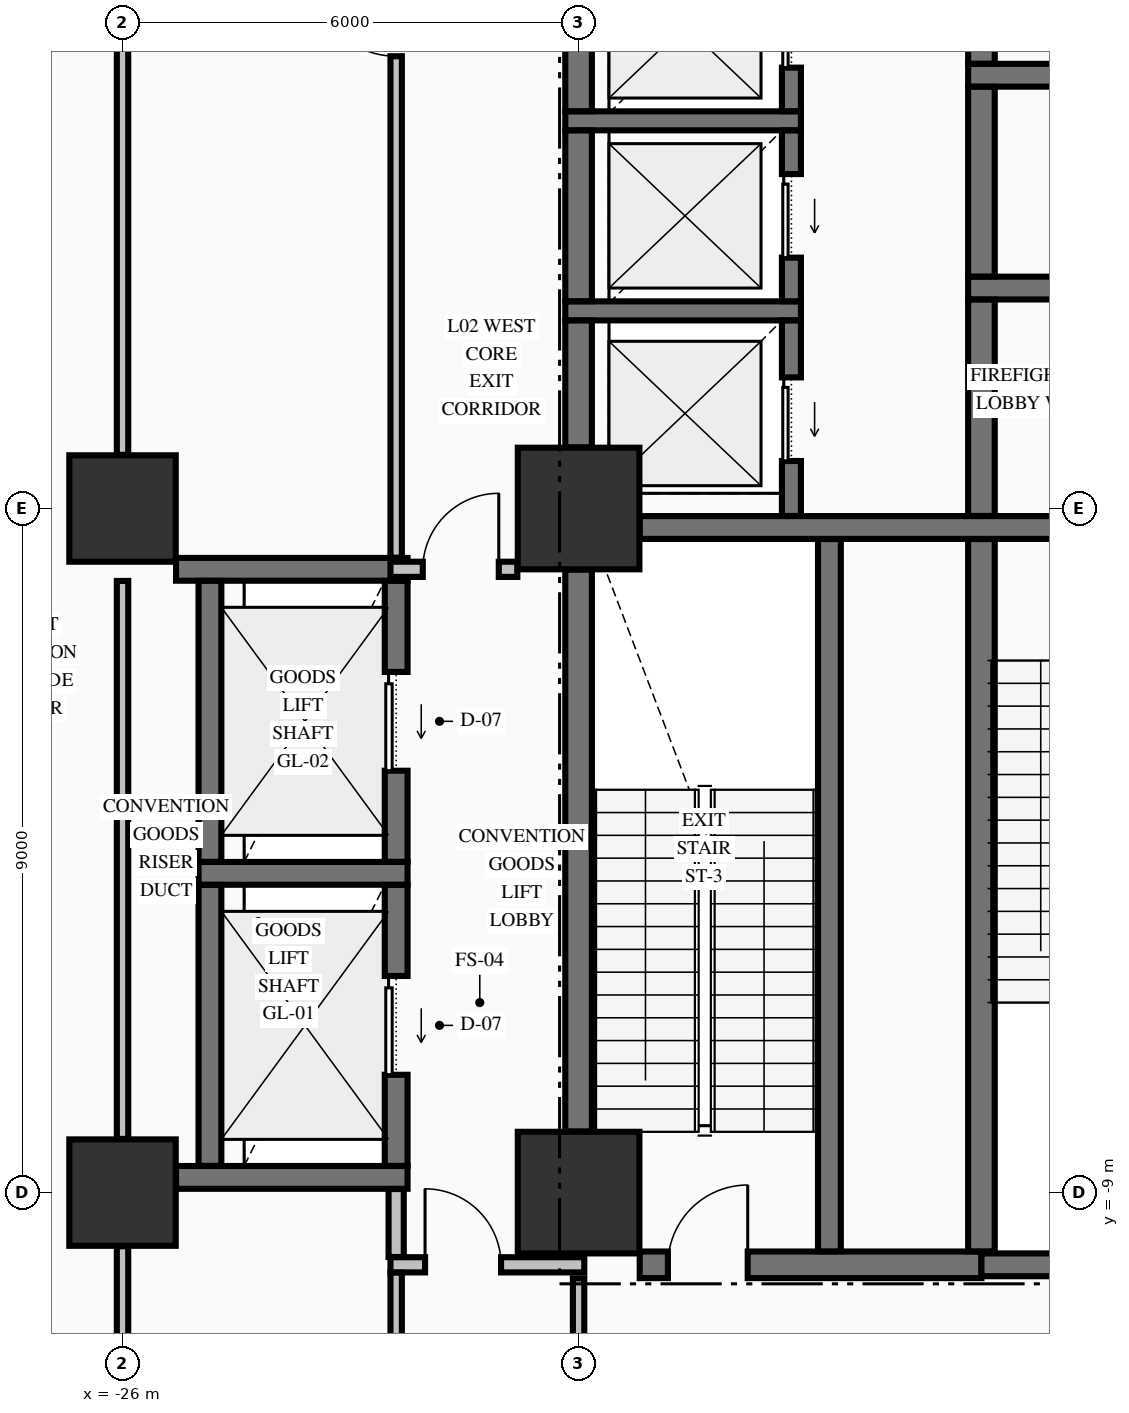
"""IFC4 building model, lengths in metres.
Left out: names, types, materials, properties, quantities, classifications, styles, units other than length and angle.
Written with IfcOpenShell. Run it as: python <this file> out.ifc"""

import sys

from ifc_helpers import new_model, si_unit, direction, frame, frame_2d, origin, origin_2d, place, context, subcontext, project, spatial, rectangle, extrude, element, fill, save


model = new_model("IFC4")
c1 = context("Model", 3, precision=1e-05, world=origin(), true_north=direction((0.0, 1.0)))
c2 = subcontext(c1, "Body", "Model", "MODEL_VIEW")
j1 = project(units=[si_unit("LENGTHUNIT", "METRE"), si_unit("PLANEANGLEUNIT", "RADIAN")], contexts=[c1])
p1 = place(None, origin())
s1 = spatial("IfcSite", under=j1, at=p1, CompositionType="ELEMENT")
p2 = place(p1, origin())
s2 = spatial("IfcBuilding", under=s1, at=p2, CompositionType="ELEMENT")
p3 = place(p2, frame((0.0, 0.0, 10.88)))
s3 = spatial("IfcBuildingStorey", under=s2, at=p3, CompositionType="ELEMENT", Elevation=10.88)
for number, where, z_axis, x_axis in (
    (1, (-26.0, -9.0, 0.0), (0.0, 0.0, 1.0), (1.0, 0.0, 0.0)),
    (2, (-26.0, 0.0, 0.0), (0.0, 0.0, 1.0), (1.0, 0.0, 0.0)),
):
    element("IfcColumn", number, at=place(p3, frame(where, z_axis=z_axis, x_axis=x_axis)), inside=s3, PredefinedType="COLUMN", context=c2, shape_type="SweptSolid", body=[
        extrude(rectangle(XDim=1.4, YDim=1.4, at=origin_2d()), origin(), (0.0, 0.0, 1.0), 5.09),
    ])
for number, where, z_axis, x_axis in (
    (3, (-20.0, -9.0, 0.0), (0.0, 0.0, 1.0), (1.0, 0.0, 0.0)),
    (4, (-20.0, 0.0, 0.0), (0.0, 0.0, 1.0), (1.0, 0.0, 0.0)),
):
    element("IfcColumn", number, at=place(p3, frame(where, z_axis=z_axis, x_axis=x_axis)), inside=s3, PredefinedType="COLUMN", context=c2, shape_type="SweptSolid", body=[
        extrude(rectangle(XDim=1.6, YDim=1.6, at=origin_2d()), origin(), (0.0, 0.0, 1.0), 5.09),
    ])
p4 = place(p3, frame((-19.196, -9.95, 0.0), z_axis=(0.0, 0.0, 1.0), x_axis=(1.0, 0.0, 0.0)))
e5 = element("IfcWall", 5, at=p4, inside=s3, PredefinedType="SHEAR", context=c2, shape_type="SweptSolid", body=[
    extrude(rectangle(XDim=4.496, YDim=0.35, at=frame_2d((2.248, 0.0))), origin(), (0.0, 0.0, 1.0), 5.09),
])
p5 = place(p4, frame((0.371, 0.0, 0.0)))
e6 = element("IfcOpeningElement", 6, at=p5, cuts=e5, PredefinedType="OPENING", context=c2, shape_type="SweptSolid", body=[
    extrude(rectangle(XDim=1.05, YDim=2.15, at=frame_2d((0.525, 1.075))), frame((0.0, 0.185, 0.0), z_axis=(0.0, -1.0, 0.0), x_axis=(1.0, 0.0, 0.0)), (0.0, 0.0, 1.0), 0.37),
])
p6 = place(p3, frame((-14.7, -9.95, 0.0), z_axis=(0.0, 0.0, 1.0), x_axis=(1.0, 0.0, 0.0)))
e7 = element("IfcWall", 7, at=p6, inside=s3, PredefinedType="SHEAR", context=c2, shape_type="SweptSolid", body=[
    extrude(rectangle(XDim=3.85, YDim=0.3, at=frame_2d((1.925, 0.0))), origin(), (0.0, 0.0, 1.0), 5.09),
])
p7 = place(p3, frame((-25.296, -8.8, 0.0), z_axis=(0.0, 0.0, 1.0), x_axis=(1.0, 0.0, 0.0)))
e8 = element("IfcWall", 8, at=p7, inside=s3, PredefinedType="SHEAR", context=c2, shape_type="SweptSolid", body=[
    extrude(rectangle(XDim=3.046, YDim=0.3, at=frame_2d((1.523, 0.0))), origin(), (0.0, 0.0, 1.0), 5.09),
])
p8 = place(p3, frame((-25.0, -4.8, 0.0), z_axis=(0.0, 0.0, 1.0), x_axis=(1.0, 0.0, 0.0)))
e9 = element("IfcWall", 9, at=p8, inside=s3, PredefinedType="SHEAR", context=c2, shape_type="SweptSolid", body=[
    extrude(rectangle(XDim=2.75, YDim=0.3, at=frame_2d((1.375, 0.0))), origin(), (0.0, 0.0, 1.0), 5.09),
])
p9 = place(p3, frame((-25.296, -0.8, 0.0), z_axis=(0.0, 0.0, 1.0), x_axis=(1.0, 0.0, 0.0)))
e10 = element("IfcWall", 10, at=p9, inside=s3, PredefinedType="SHEAR", context=c2, shape_type="SweptSolid", body=[
    extrude(rectangle(XDim=3.046, YDim=0.3, at=frame_2d((1.523, 0.0))), origin(), (0.0, 0.0, 1.0), 5.09),
])
p10 = place(p3, frame((-19.196, -0.25, 0.0), z_axis=(0.0, 0.0, 1.0), x_axis=(1.0, 0.0, 0.0)))
e11 = element("IfcWall", 11, at=p10, inside=s3, PredefinedType="SHEAR", context=c2, shape_type="SweptSolid", body=[
    extrude(rectangle(XDim=7.392, YDim=0.3, at=frame_2d((3.696, 0.0))), origin(), (0.0, 0.0, 1.0), 5.09),
])
p11 = place(p10, frame((5.496, 0.0, 0.0)))
e12 = element("IfcOpeningElement", 12, at=p11, cuts=e11, PredefinedType="OPENING", context=c2, shape_type="SweptSolid", body=[
    extrude(rectangle(XDim=1.1, YDim=2.15, at=frame_2d((0.55, 1.075))), frame((0.0, 0.16, 0.0), z_axis=(0.0, -1.0, 0.0), x_axis=(1.0, 0.0, 0.0)), (0.0, 0.0, 1.0), 0.32),
])
p12 = place(p3, frame((-20.175, 2.6, 0.0), z_axis=(0.0, 0.0, 1.0), x_axis=(1.0, 0.0, 0.0)))
e13 = element("IfcWall", 13, at=p12, inside=s3, PredefinedType="SOLIDWALL", context=c2, shape_type="SweptSolid", body=[
    extrude(rectangle(XDim=3.1, YDim=0.25, at=frame_2d((1.55, 0.0))), origin(), (0.0, 0.0, 1.0), 5.09),
])
p13 = place(p3, frame((-14.875, 2.9, 0.0), z_axis=(0.0, 0.0, 1.0), x_axis=(1.0, 0.0, 0.0)))
e14 = element("IfcWall", 14, at=p13, inside=s3, PredefinedType="SHEAR", context=c2, shape_type="SweptSolid", body=[
    extrude(rectangle(XDim=4.025, YDim=0.3, at=frame_2d((2.012, 0.0))), origin(), (0.0, 0.0, 1.0), 5.09),
])
p14 = place(p13, frame((2.075, 0.0, 0.0)))
e15 = element("IfcOpeningElement", 15, at=p14, cuts=e14, PredefinedType="OPENING", context=c2, shape_type="SweptSolid", body=[
    extrude(rectangle(XDim=1.1, YDim=2.2, at=frame_2d((0.55, 1.1))), frame((0.0, 0.16, 0.0), z_axis=(0.0, -1.0, 0.0), x_axis=(1.0, 0.0, 0.0)), (0.0, 0.0, 1.0), 0.32),
])
p15 = place(p3, frame((-20.175, 5.1, 0.0), z_axis=(0.0, 0.0, 1.0), x_axis=(1.0, 0.0, 0.0)))
e16 = element("IfcWall", 16, at=p15, inside=s3, PredefinedType="SOLIDWALL", context=c2, shape_type="SweptSolid", body=[
    extrude(rectangle(XDim=3.1, YDim=0.25, at=frame_2d((1.55, 0.0))), origin(), (0.0, 0.0, 1.0), 5.09),
])
p16 = place(p3, frame((-14.875, 5.7, 0.0), z_axis=(0.0, 0.0, 1.0), x_axis=(1.0, 0.0, 0.0)))
e17 = element("IfcWall", 17, at=p16, inside=s3, PredefinedType="SHEAR", context=c2, shape_type="SweptSolid", body=[
    extrude(rectangle(XDim=4.025, YDim=0.3, at=frame_2d((2.012, 0.0))), origin(), (0.0, 0.0, 1.0), 5.09),
])
p17 = place(p3, frame((-22.475, -9.95, 0.0), z_axis=(0.0, 0.0, 1.0), x_axis=(1.0, 0.0, 0.0)))
e18 = element("IfcWall", 18, at=p17, inside=s3, PredefinedType="PARTITIONING", context=c2, shape_type="SweptSolid", body=[
    extrude(rectangle(XDim=2.55, YDim=0.2, at=frame_2d((1.275, 0.0))), origin(), (0.0, 0.0, 1.0), 5.09),
])
p18 = place(p17, frame((0.455, 0.0, 0.0)))
e19 = element("IfcOpeningElement", 19, at=p18, cuts=e18, PredefinedType="OPENING", context=c2, shape_type="SweptSolid", body=[
    extrude(rectangle(XDim=1.0, YDim=2.15, at=frame_2d((0.5, 1.075))), frame((0.0, 0.11, 0.0), z_axis=(0.0, -1.0, 0.0), x_axis=(1.0, 0.0, 0.0)), (0.0, 0.0, 1.0), 0.22),
])
p19 = place(p3, frame((-22.475, -0.8, 0.0), z_axis=(0.0, 0.0, 1.0), x_axis=(1.0, 0.0, 0.0)))
e20 = element("IfcWall", 20, at=p19, inside=s3, PredefinedType="PARTITIONING", context=c2, shape_type="SweptSolid", body=[
    extrude(rectangle(XDim=1.669, YDim=0.2, at=frame_2d((0.834, 0.0))), origin(), (0.0, 0.0, 1.0), 5.09),
])
p20 = place(p19, frame((0.425, 0.0, 0.0)))
e21 = element("IfcOpeningElement", 21, at=p20, cuts=e20, PredefinedType="OPENING", context=c2, shape_type="SweptSolid", body=[
    extrude(rectangle(XDim=1.0, YDim=2.15, at=frame_2d((0.5, 1.075))), frame((0.0, 0.11, 0.0), z_axis=(0.0, -1.0, 0.0), x_axis=(1.0, 0.0, 0.0)), (0.0, 0.0, 1.0), 0.22),
])
for number, where, z_axis, x_axis in (
    (22, (-24.85, -8.648, 0.0), (0.0, 0.0, 1.0), (0.0, 1.0, 0.0)),
    (23, (-24.85, -4.648, 0.0), (0.0, 0.0, 1.0), (0.0, 1.0, 0.0)),
):
    element("IfcWall", number, at=place(p3, frame(where, z_axis=z_axis, x_axis=x_axis)), inside=s3, PredefinedType="SHEAR", context=c2, shape_type="SweptSolid", body=[
        extrude(rectangle(XDim=3.696, YDim=0.3, at=frame_2d((1.848, 0.0))), origin(), (0.0, 0.0, 1.0), 5.09),
    ])
p21 = place(p3, frame((-22.4, -8.648, 0.0), z_axis=(0.0, 0.0, 1.0), x_axis=(0.0, 1.0, 0.0)))
e24 = element("IfcWall", 24, at=p21, inside=s3, PredefinedType="SHEAR", context=c2, shape_type="SweptSolid", body=[
    extrude(rectangle(XDim=3.696, YDim=0.3, at=frame_2d((1.848, 0.0))), origin(), (0.0, 0.0, 1.0), 5.09),
])
p22 = place(p21, frame((1.198, 0.0, 0.0)))
e25 = element("IfcOpeningElement", 25, at=p22, cuts=e24, PredefinedType="OPENING", context=c2, shape_type="SweptSolid", body=[
    extrude(rectangle(XDim=1.3, YDim=2.3, at=frame_2d((0.65, 1.15))), frame((0.0, 0.16, 0.0), z_axis=(0.0, -1.0, 0.0), x_axis=(1.0, 0.0, 0.0)), (0.0, 0.0, 1.0), 0.32),
])
p23 = place(p3, frame((-22.4, -4.648, 0.0), z_axis=(0.0, 0.0, 1.0), x_axis=(0.0, 1.0, 0.0)))
e26 = element("IfcWall", 26, at=p23, inside=s3, PredefinedType="SHEAR", context=c2, shape_type="SweptSolid", body=[
    extrude(rectangle(XDim=3.696, YDim=0.3, at=frame_2d((1.848, 0.0))), origin(), (0.0, 0.0, 1.0), 5.09),
])
p24 = place(p23, frame((1.198, 0.0, 0.0)))
e27 = element("IfcOpeningElement", 27, at=p24, cuts=e26, PredefinedType="OPENING", context=c2, shape_type="SweptSolid", body=[
    extrude(rectangle(XDim=1.3, YDim=2.3, at=frame_2d((0.65, 1.15))), frame((0.0, 0.16, 0.0), z_axis=(0.0, -1.0, 0.0), x_axis=(1.0, 0.0, 0.0)), (0.0, 0.0, 1.0), 0.32),
])
p25 = place(p3, frame((-20.0, -8.196, 0.0), z_axis=(0.0, 0.0, 1.0), x_axis=(0.0, 1.0, 0.0)))
e28 = element("IfcWall", 28, at=p25, inside=s3, PredefinedType="SHEAR", context=c2, shape_type="SweptSolid", body=[
    extrude(rectangle(XDim=7.392, YDim=0.35, at=frame_2d((3.696, 0.0))), origin(), (0.0, 0.0, 1.0), 5.09),
])
p26 = place(p3, frame((-20.0, 0.804, 0.0), z_axis=(0.0, 0.0, 1.0), x_axis=(0.0, 1.0, 0.0)))
e29 = element("IfcWall", 29, at=p26, inside=s3, PredefinedType="SHEAR", context=c2, shape_type="SweptSolid", body=[
    extrude(rectangle(XDim=1.669, YDim=0.35, at=frame_2d((0.834, 0.0))), origin(), (0.0, 0.0, 1.0), 5.09),
])
for number, where, z_axis, x_axis in (
    (30, (-20.0, 2.727, 0.0), (0.0, 0.0, 1.0), (0.0, 1.0, 0.0)),
    (31, (-20.0, 5.227, 0.0), (0.0, 0.0, 1.0), (0.0, 1.0, 0.0)),
):
    element("IfcWall", number, at=place(p3, frame(where, z_axis=z_axis, x_axis=x_axis)), inside=s3, PredefinedType="SHEAR", context=c2, shape_type="SweptSolid", body=[
        extrude(rectangle(XDim=2.246, YDim=0.35, at=frame_2d((1.123, 0.0))), origin(), (0.0, 0.0, 1.0), 5.09),
    ])
p27 = place(p3, frame((-17.2, -0.098, 0.0), z_axis=(0.0, 0.0, 1.0), x_axis=(0.0, 1.0, 0.0)))
e32 = element("IfcWall", 32, at=p27, inside=s3, PredefinedType="SOLIDWALL", context=c2, shape_type="SweptSolid", body=[
    extrude(rectangle(XDim=2.571, YDim=0.25, at=frame_2d((1.285, 0.0))), origin(), (0.0, 0.0, 1.0), 5.09),
])
p28 = place(p27, frame((0.723, 0.0, 0.0)))
e33 = element("IfcOpeningElement", 33, at=p28, cuts=e32, PredefinedType="OPENING", context=c2, shape_type="SweptSolid", body=[
    extrude(rectangle(XDim=1.1, YDim=2.2, at=frame_2d((0.55, 1.1))), frame((0.0, 0.135, 0.0), z_axis=(0.0, -1.0, 0.0), x_axis=(1.0, 0.0, 0.0)), (0.0, 0.0, 1.0), 0.27),
])
p29 = place(p3, frame((-17.2, 2.727, 0.0), z_axis=(0.0, 0.0, 1.0), x_axis=(0.0, 1.0, 0.0)))
e34 = element("IfcWall", 34, at=p29, inside=s3, PredefinedType="SOLIDWALL", context=c2, shape_type="SweptSolid", body=[
    extrude(rectangle(XDim=2.246, YDim=0.25, at=frame_2d((1.123, 0.0))), origin(), (0.0, 0.0, 1.0), 5.09),
])
p30 = place(p29, frame((0.573, 0.0, 0.0)))
e35 = element("IfcOpeningElement", 35, at=p30, cuts=e34, PredefinedType="OPENING", context=c2, shape_type="SweptSolid", body=[
    extrude(rectangle(XDim=1.1, YDim=2.2, at=frame_2d((0.55, 1.1))), frame((0.0, 0.135, 0.0), z_axis=(0.0, -1.0, 0.0), x_axis=(1.0, 0.0, 0.0)), (0.0, 0.0, 1.0), 0.27),
])
p31 = place(p3, frame((-17.2, 5.227, 0.0), z_axis=(0.0, 0.0, 1.0), x_axis=(0.0, 1.0, 0.0)))
e36 = element("IfcWall", 36, at=p31, inside=s3, PredefinedType="SOLIDWALL", context=c2, shape_type="SweptSolid", body=[
    extrude(rectangle(XDim=2.246, YDim=0.25, at=frame_2d((1.123, 0.0))), origin(), (0.0, 0.0, 1.0), 5.09),
])
p32 = place(p31, frame((0.573, 0.0, 0.0)))
e37 = element("IfcOpeningElement", 37, at=p32, cuts=e36, PredefinedType="OPENING", context=c2, shape_type="SweptSolid", body=[
    extrude(rectangle(XDim=1.1, YDim=2.2, at=frame_2d((0.55, 1.1))), frame((0.0, 0.135, 0.0), z_axis=(0.0, -1.0, 0.0), x_axis=(1.0, 0.0, 0.0)), (0.0, 0.0, 1.0), 0.27),
])
p33 = place(p3, frame((-16.7, -9.773, 0.0), z_axis=(0.0, 0.0, 1.0), x_axis=(0.0, 1.0, 0.0)))
e38 = element("IfcWall", 38, at=p33, inside=s3, PredefinedType="SHEAR", context=c2, shape_type="SweptSolid", body=[
    extrude(rectangle(XDim=9.371, YDim=0.3, at=frame_2d((4.686, 0.0))), origin(), (0.0, 0.0, 1.0), 5.09),
])
p34 = place(p3, frame((-14.7, -9.773, 0.0), z_axis=(0.0, 0.0, 1.0), x_axis=(0.0, 1.0, 0.0)))
e39 = element("IfcWall", 39, at=p34, inside=s3, PredefinedType="SHEAR", context=c2, shape_type="SweptSolid", body=[
    extrude(rectangle(XDim=9.371, YDim=0.35, at=frame_2d((4.686, 0.0))), origin(), (0.0, 0.0, 1.0), 5.09),
])
p35 = place(p3, frame((-14.7, -0.098, 0.0), z_axis=(0.0, 0.0, 1.0), x_axis=(0.0, 1.0, 0.0)))
e40 = element("IfcWall", 40, at=p35, inside=s3, PredefinedType="SHEAR", context=c2, shape_type="SweptSolid", body=[
    extrude(rectangle(XDim=2.846, YDim=0.35, at=frame_2d((1.423, 0.0))), origin(), (0.0, 0.0, 1.0), 5.09),
])
p36 = place(p3, frame((-14.7, 3.052, 0.0), z_axis=(0.0, 0.0, 1.0), x_axis=(0.0, 1.0, 0.0)))
e41 = element("IfcWall", 41, at=p36, inside=s3, PredefinedType="SHEAR", context=c2, shape_type="SweptSolid", body=[
    extrude(rectangle(XDim=2.496, YDim=0.35, at=frame_2d((1.248, 0.0))), origin(), (0.0, 0.0, 1.0), 5.09),
])
p37 = place(p3, frame((-14.7, 5.852, 0.0), z_axis=(0.0, 0.0, 1.0), x_axis=(0.0, 1.0, 0.0)))
e42 = element("IfcWall", 42, at=p37, inside=s3, PredefinedType="SHEAR", context=c2, shape_type="SweptSolid", body=[
    extrude(rectangle(XDim=4.471, YDim=0.35, at=frame_2d((2.235, 0.0))), origin(), (0.0, 0.0, 1.0), 5.09),
])
p38 = place(p3, frame((-26.0, -15.294, 0.0), z_axis=(0.0, 0.0, 1.0), x_axis=(0.0, 1.0, 0.0)))
e43 = element("IfcWall", 43, at=p38, inside=s3, PredefinedType="PARTITIONING", context=c2, shape_type="SweptSolid", body=[
    extrude(rectangle(XDim=5.588, YDim=0.15, at=frame_2d((2.794, 0.0))), origin(), (0.0, 0.0, 1.0), 4.132),
])
p39 = place(p3, frame((-26.0, -8.294, 0.0), z_axis=(0.0, 0.0, 1.0), x_axis=(0.0, 1.0, 0.0)))
e44 = element("IfcWall", 44, at=p39, inside=s3, PredefinedType="PARTITIONING", context=c2, shape_type="SweptSolid", body=[
    extrude(rectangle(XDim=7.341, YDim=0.15, at=frame_2d((3.67, 0.0))), origin(), (0.0, 0.0, 1.0), 4.132),
])
p40 = place(p3, frame((-26.0, 0.706, 0.0), z_axis=(0.0, 0.0, 1.0), x_axis=(0.0, 1.0, 0.0)))
e45 = element("IfcWall", 45, at=p40, inside=s3, PredefinedType="PARTITIONING", context=c2, shape_type="SweptSolid", body=[
    extrude(rectangle(XDim=7.588, YDim=0.15, at=frame_2d((3.794, 0.0))), origin(), (0.0, 0.0, 1.0), 4.132),
])
p41 = place(p3, frame((-22.4, -16.122, 0.0), z_axis=(0.0, 0.0, 1.0), x_axis=(0.0, 1.0, 0.0)))
e46 = element("IfcWall", 46, at=p41, inside=s3, PredefinedType="PARTITIONING", context=c2, shape_type="SweptSolid", body=[
    extrude(rectangle(XDim=6.069, YDim=0.15, at=frame_2d((3.035, 0.0))), origin(), (0.0, 0.0, 1.0), 5.09),
])
p42 = place(p3, frame((-22.4, -9.847, 0.0), z_axis=(0.0, 0.0, 1.0), x_axis=(0.0, 1.0, 0.0)))
e47 = element("IfcWall", 47, at=p42, inside=s3, PredefinedType="PARTITIONING", context=c2, shape_type="SweptSolid", body=[
    extrude(rectangle(XDim=0.894, YDim=0.2, at=frame_2d((0.447, 0.0))), origin(), (0.0, 0.0, 1.0), 5.09),
])
p43 = place(p3, frame((-22.4, -0.647, 0.0), z_axis=(0.0, 0.0, 1.0), x_axis=(0.0, 1.0, 0.0)))
e48 = element("IfcWall", 48, at=p43, inside=s3, PredefinedType="PARTITIONING", context=c2, shape_type="SweptSolid", body=[
    extrude(rectangle(XDim=16.569, YDim=0.15, at=frame_2d((8.285, 0.0))), origin(), (0.0, 0.0, 1.0), 5.09),
])
p44 = place(p43, frame((6.597, 0.0, 0.0)))
e49 = element("IfcOpeningElement", 49, at=p44, cuts=e48, PredefinedType="OPENING", context=c2, shape_type="SweptSolid", body=[
    extrude(rectangle(XDim=1.1, YDim=2.15, at=frame_2d((0.55, 1.075))), frame((0.0, 0.085, 0.0), z_axis=(0.0, -1.0, 0.0), x_axis=(1.0, 0.0, 0.0)), (0.0, 0.0, 1.0), 0.17),
])
p45 = place(p3, frame((-20.0, -15.194, 0.0), z_axis=(0.0, 0.0, 1.0), x_axis=(0.0, 1.0, 0.0)))
e50 = element("IfcWall", 50, at=p45, inside=s3, PredefinedType="PARTITIONING", context=c2, shape_type="SweptSolid", body=[
    extrude(rectangle(XDim=5.066, YDim=0.15, at=frame_2d((2.533, 0.0))), origin(), (0.0, 0.0, 1.0), 5.09),
])
p46 = place(p45, frame((1.569, 0.0, 0.0)))
e51 = element("IfcOpeningElement", 51, at=p46, cuts=e50, PredefinedType="OPENING", context=c2, shape_type="SweptSolid", body=[
    extrude(rectangle(XDim=1.05, YDim=2.15, at=frame_2d((0.525, 1.075))), frame((0.0, 0.085, 0.0), z_axis=(0.0, -1.0, 0.0), x_axis=(1.0, 0.0, 0.0)), (0.0, 0.0, 1.0), 0.17),
])
p47 = place(p5, origin())
e52 = element("IfcDoor", 52, at=p47, inside=s3, OperationType="SINGLE_SWING_RIGHT", PredefinedType="DOOR", context=c2, shape_type="SweptSolid", body=[
    extrude(rectangle(XDim=1.05, YDim=2.15, at=frame_2d((0.525, 1.075))), frame((0.0, 0.025, 0.0), z_axis=(0.0, -1.0, 0.0), x_axis=(1.0, 0.0, 0.0)), (0.0, 0.0, 1.0), 0.05),
])
fill(e6, e52)
p48 = place(p28, origin())
e53 = element("IfcDoor", 53, at=p48, inside=s3, OperationType="SLIDING_TO_LEFT", PredefinedType="DOOR", context=c2, shape_type="SweptSolid", body=[
    extrude(rectangle(XDim=1.1, YDim=2.2, at=frame_2d((0.55, 1.1))), frame((0.0, 0.025, 0.0), z_axis=(0.0, -1.0, 0.0), x_axis=(1.0, 0.0, 0.0)), (0.0, 0.0, 1.0), 0.05),
])
fill(e33, e53)
p49 = place(p30, origin())
e54 = element("IfcDoor", 54, at=p49, inside=s3, OperationType="SLIDING_TO_LEFT", PredefinedType="DOOR", context=c2, shape_type="SweptSolid", body=[
    extrude(rectangle(XDim=1.1, YDim=2.2, at=frame_2d((0.55, 1.1))), frame((0.0, 0.025, 0.0), z_axis=(0.0, -1.0, 0.0), x_axis=(1.0, 0.0, 0.0)), (0.0, 0.0, 1.0), 0.05),
])
fill(e35, e54)
p50 = place(p32, origin())
e55 = element("IfcDoor", 55, at=p50, inside=s3, OperationType="SLIDING_TO_LEFT", PredefinedType="DOOR", context=c2, shape_type="SweptSolid", body=[
    extrude(rectangle(XDim=1.1, YDim=2.2, at=frame_2d((0.55, 1.1))), frame((0.0, 0.025, 0.0), z_axis=(0.0, -1.0, 0.0), x_axis=(1.0, 0.0, 0.0)), (0.0, 0.0, 1.0), 0.05),
])
fill(e37, e55)
p51 = place(p22, origin())
e56 = element("IfcDoor", 56, at=p51, inside=s3, OperationType="SLIDING_TO_LEFT", PredefinedType="DOOR", context=c2, shape_type="SweptSolid", body=[
    extrude(rectangle(XDim=1.3, YDim=2.3, at=frame_2d((0.65, 1.15))), frame((0.0, 0.025, 0.0), z_axis=(0.0, -1.0, 0.0), x_axis=(1.0, 0.0, 0.0)), (0.0, 0.0, 1.0), 0.05),
])
fill(e25, e56)
p52 = place(p24, origin())
e57 = element("IfcDoor", 57, at=p52, inside=s3, OperationType="SLIDING_TO_LEFT", PredefinedType="DOOR", context=c2, shape_type="SweptSolid", body=[
    extrude(rectangle(XDim=1.3, YDim=2.3, at=frame_2d((0.65, 1.15))), frame((0.0, 0.025, 0.0), z_axis=(0.0, -1.0, 0.0), x_axis=(1.0, 0.0, 0.0)), (0.0, 0.0, 1.0), 0.05),
])
fill(e27, e57)
p53 = place(p20, origin())
e58 = element("IfcDoor", 58, at=p53, inside=s3, OperationType="SINGLE_SWING_RIGHT", PredefinedType="DOOR", context=c2, shape_type="SweptSolid", body=[
    extrude(rectangle(XDim=1.0, YDim=2.15, at=frame_2d((0.5, 1.075))), frame((0.0, 0.025, 0.0), z_axis=(0.0, -1.0, 0.0), x_axis=(1.0, 0.0, 0.0)), (0.0, 0.0, 1.0), 0.05),
])
fill(e21, e58)
p54 = place(p44, origin())
e59 = element("IfcDoor", 59, at=p54, inside=s3, OperationType="SINGLE_SWING_RIGHT", PredefinedType="DOOR", context=c2, shape_type="SweptSolid", body=[
    extrude(rectangle(XDim=1.1, YDim=2.15, at=frame_2d((0.55, 1.075))), frame((0.0, 0.025, 0.0), z_axis=(0.0, -1.0, 0.0), x_axis=(1.0, 0.0, 0.0)), (0.0, 0.0, 1.0), 0.05),
])
fill(e49, e59)
p55 = place(p18, origin())
e60 = element("IfcDoor", 60, at=p55, inside=s3, OperationType="SINGLE_SWING_LEFT", PredefinedType="DOOR", context=c2, shape_type="SweptSolid", body=[
    extrude(rectangle(XDim=1.0, YDim=2.15, at=frame_2d((0.5, 1.075))), frame((0.0, 0.025, 0.0), z_axis=(0.0, -1.0, 0.0), x_axis=(1.0, 0.0, 0.0)), (0.0, 0.0, 1.0), 0.05),
])
fill(e19, e60)
save(model, sys.argv[1])
